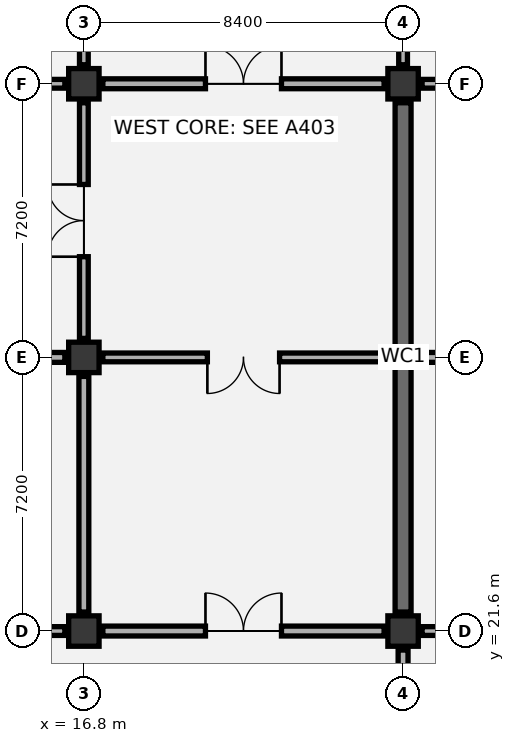
"""IFC4 building model, lengths in metres.
Left out: names, types, materials, properties, quantities, classifications, styles, units other than length and angle.
Written with IfcOpenShell. Run it as: python <this file> out.ifc"""

import sys

from ifc_helpers import new_model, si_unit, direction, frame, frame_2d, origin, origin_2d, place, context, subcontext, project, spatial, rectangle, extrude, element, fill, save


model = new_model("IFC4")
c1 = context("Model", 3, precision=1e-05, world=origin(), true_north=direction((0.0, 1.0)))
c2 = subcontext(c1, "Body", "Model", "MODEL_VIEW")
j1 = project(units=[si_unit("LENGTHUNIT", "METRE"), si_unit("PLANEANGLEUNIT", "RADIAN")], contexts=[c1])
p1 = place(None, origin())
s1 = spatial("IfcSite", under=j1, at=p1, CompositionType="ELEMENT")
p2 = place(p1, origin())
s2 = spatial("IfcBuilding", under=s1, at=p2, CompositionType="ELEMENT")
p3 = place(p2, frame((0.0, 0.0, -9.6)))
s3 = spatial("IfcBuildingStorey", under=s2, at=p3, CompositionType="ELEMENT", Elevation=-9.6)
for number, where, z_axis, x_axis in (
    (1, (16.8, 21.6, 0.0), (0.0, 0.0, 1.0), (1.0, 0.0, 0.0)),
    (2, (16.8, 28.8, 0.0), (0.0, 0.0, 1.0), (1.0, 0.0, 0.0)),
    (3, (16.8, 36.0, 0.0), (0.0, 0.0, 1.0), (1.0, 0.0, 0.0)),
    (4, (25.2, 21.6, 0.0), (0.0, 0.0, 1.0), (1.0, 0.0, 0.0)),
    (5, (25.2, 36.0, 0.0), (0.0, 0.0, 1.0), (1.0, 0.0, 0.0)),
):
    element("IfcColumn", number, at=place(p3, frame(where, z_axis=z_axis, x_axis=x_axis)), inside=s3, PredefinedType="COLUMN", context=c2, shape_type="SweptSolid", body=[
        extrude(rectangle(XDim=0.8, YDim=0.8, at=origin_2d()), origin(), (0.0, 0.0, 1.0), 4.8),
    ])
p4 = place(p3, frame((25.2, 22.1, 0.0), z_axis=(0.0, 0.0, 1.0), x_axis=(0.0, 1.0, 0.0)))
e6 = element("IfcWall", 6, at=p4, inside=s3, PredefinedType="SHEAR", context=c2, shape_type="SweptSolid", body=[
    extrude(rectangle(XDim=13.4, YDim=0.42, at=frame_2d((6.7, 0.0))), origin(), (0.0, 0.0, 1.0), 3.9),
])
p5 = place(p3, frame((8.9, 21.6, 0.0), z_axis=(0.0, 0.0, 1.0), x_axis=(1.0, 0.0, 0.0)))
e7 = element("IfcWall", 7, at=p5, inside=s3, PredefinedType="PARTITIONING", context=c2, shape_type="SweptSolid", body=[
    extrude(rectangle(XDim=7.4, YDim=0.23, at=frame_2d((3.7, 0.0))), origin(), (0.0, 0.0, 1.0), 3.495),
])
p6 = place(p5, frame((2.75, 0.0, 0.0)))
e8 = element("IfcOpeningElement", 8, at=p6, cuts=e7, PredefinedType="OPENING", context=c2, shape_type="SweptSolid", body=[
    extrude(rectangle(XDim=1.9, YDim=2.3, at=frame_2d((0.95, 1.15))), frame((0.0, 0.125, 0.0), z_axis=(0.0, -1.0, 0.0), x_axis=(1.0, 0.0, 0.0)), (0.0, 0.0, 1.0), 0.25),
])
p7 = place(p3, frame((16.8, 22.1, 0.0), z_axis=(0.0, 0.0, 1.0), x_axis=(0.0, 1.0, 0.0)))
e9 = element("IfcWall", 9, at=p7, inside=s3, PredefinedType="PARTITIONING", context=c2, shape_type="SweptSolid", body=[
    extrude(rectangle(XDim=6.2, YDim=0.26, at=frame_2d((3.1, 0.0))), origin(), (0.0, 0.0, 1.0), 3.095),
])
p8 = place(p3, frame((8.9, 28.8, 0.0), z_axis=(0.0, 0.0, 1.0), x_axis=(1.0, 0.0, 0.0)))
e10 = element("IfcWall", 10, at=p8, inside=s3, PredefinedType="PARTITIONING", context=c2, shape_type="SweptSolid", body=[
    extrude(rectangle(XDim=7.4, YDim=0.26, at=frame_2d((3.7, 0.0))), origin(), (0.0, 0.0, 1.0), 3.495),
])
p9 = place(p8, frame((2.7, 0.0, 0.0)))
e11 = element("IfcOpeningElement", 11, at=p9, cuts=e10, PredefinedType="OPENING", context=c2, shape_type="SweptSolid", body=[
    extrude(rectangle(XDim=2.0, YDim=2.35, at=frame_2d((1.0, 1.175))), frame((0.0, 0.14, 0.0), z_axis=(0.0, -1.0, 0.0), x_axis=(1.0, 0.0, 0.0)), (0.0, 0.0, 1.0), 0.28),
])
p10 = place(p3, frame((16.8, 29.3, 0.0), z_axis=(0.0, 0.0, 1.0), x_axis=(0.0, 1.0, 0.0)))
e12 = element("IfcWall", 12, at=p10, inside=s3, PredefinedType="PARTITIONING", context=c2, shape_type="SweptSolid", body=[
    extrude(rectangle(XDim=6.2, YDim=0.23, at=frame_2d((3.1, 0.0))), origin(), (0.0, 0.0, 1.0), 3.095),
])
p11 = place(p10, frame((2.15, 0.0, 0.0)))
e13 = element("IfcOpeningElement", 13, at=p11, cuts=e12, PredefinedType="OPENING", context=c2, shape_type="SweptSolid", body=[
    extrude(rectangle(XDim=1.9, YDim=2.3, at=frame_2d((0.95, 1.15))), frame((0.0, 0.125, 0.0), z_axis=(0.0, -1.0, 0.0), x_axis=(1.0, 0.0, 0.0)), (0.0, 0.0, 1.0), 0.25),
])
p12 = place(p3, frame((8.9, 36.0, 0.0), z_axis=(0.0, 0.0, 1.0), x_axis=(1.0, 0.0, 0.0)))
e14 = element("IfcWall", 14, at=p12, inside=s3, PredefinedType="PARTITIONING", context=c2, shape_type="SweptSolid", body=[
    extrude(rectangle(XDim=7.4, YDim=0.23, at=frame_2d((3.7, 0.0))), origin(), (0.0, 0.0, 1.0), 3.495),
])
p13 = place(p12, frame((2.95, 0.0, 0.0)))
e15 = element("IfcOpeningElement", 15, at=p13, cuts=e14, PredefinedType="OPENING", context=c2, shape_type="SweptSolid", body=[
    extrude(rectangle(XDim=1.5, YDim=2.15, at=frame_2d((0.75, 1.075))), frame((0.0, 0.125, 0.0), z_axis=(0.0, -1.0, 0.0), x_axis=(1.0, 0.0, 0.0)), (0.0, 0.0, 1.0), 0.25),
])
p14 = place(p3, frame((16.8, 36.5, 0.0), z_axis=(0.0, 0.0, 1.0), x_axis=(0.0, 1.0, 0.0)))
e16 = element("IfcWall", 16, at=p14, inside=s3, PredefinedType="PARTITIONING", context=c2, shape_type="SweptSolid", body=[
    extrude(rectangle(XDim=6.2, YDim=0.23, at=frame_2d((3.1, 0.0))), origin(), (0.0, 0.0, 1.0), 3.595),
])
p15 = place(p3, frame((25.2, 14.9, 0.0), z_axis=(0.0, 0.0, 1.0), x_axis=(0.0, 1.0, 0.0)))
e17 = element("IfcWall", 17, at=p15, inside=s3, PredefinedType="PARTITIONING", context=c2, shape_type="SweptSolid", body=[
    extrude(rectangle(XDim=6.2, YDim=0.26, at=frame_2d((3.1, 0.0))), origin(), (0.0, 0.0, 1.0), 3.595),
])
p16 = place(p15, frame((2.15, 0.0, 0.0)))
e18 = element("IfcOpeningElement", 18, at=p16, cuts=e17, PredefinedType="OPENING", context=c2, shape_type="SweptSolid", body=[
    extrude(rectangle(XDim=1.9, YDim=2.3, at=frame_2d((0.95, 1.15))), frame((0.0, 0.14, 0.0), z_axis=(0.0, -1.0, 0.0), x_axis=(1.0, 0.0, 0.0)), (0.0, 0.0, 1.0), 0.28),
])
p17 = place(p3, frame((17.3, 21.6, 0.0), z_axis=(0.0, 0.0, 1.0), x_axis=(1.0, 0.0, 0.0)))
e19 = element("IfcWall", 19, at=p17, inside=s3, PredefinedType="PARTITIONING", context=c2, shape_type="SweptSolid", body=[
    extrude(rectangle(XDim=7.4, YDim=0.26, at=frame_2d((3.7, 0.0))), origin(), (0.0, 0.0, 1.0), 2.995),
])
p18 = place(p17, frame((2.7, 0.0, 0.0)))
e20 = element("IfcOpeningElement", 20, at=p18, cuts=e19, PredefinedType="OPENING", context=c2, shape_type="SweptSolid", body=[
    extrude(rectangle(XDim=2.0, YDim=2.35, at=frame_2d((1.0, 1.175))), frame((0.0, 0.14, 0.0), z_axis=(0.0, -1.0, 0.0), x_axis=(1.0, 0.0, 0.0)), (0.0, 0.0, 1.0), 0.28),
])
p19 = place(p3, frame((17.3, 28.8, 0.0), z_axis=(0.0, 0.0, 1.0), x_axis=(1.0, 0.0, 0.0)))
e21 = element("IfcWall", 21, at=p19, inside=s3, PredefinedType="PARTITIONING", context=c2, shape_type="SweptSolid", body=[
    extrude(rectangle(XDim=7.4, YDim=0.23, at=frame_2d((3.7, 0.0))), origin(), (0.0, 0.0, 1.0), 3.9),
])
p20 = place(p19, frame((2.75, 0.0, 0.0)))
e22 = element("IfcOpeningElement", 22, at=p20, cuts=e21, PredefinedType="OPENING", context=c2, shape_type="SweptSolid", body=[
    extrude(rectangle(XDim=1.9, YDim=2.3, at=frame_2d((0.95, 1.15))), frame((0.0, 0.125, 0.0), z_axis=(0.0, -1.0, 0.0), x_axis=(1.0, 0.0, 0.0)), (0.0, 0.0, 1.0), 0.25),
])
p21 = place(p3, frame((17.3, 36.0, 0.0), z_axis=(0.0, 0.0, 1.0), x_axis=(1.0, 0.0, 0.0)))
e23 = element("IfcWall", 23, at=p21, inside=s3, PredefinedType="PARTITIONING", context=c2, shape_type="SweptSolid", body=[
    extrude(rectangle(XDim=7.4, YDim=0.26, at=frame_2d((3.7, 0.0))), origin(), (0.0, 0.0, 1.0), 2.995),
])
p22 = place(p21, frame((2.7, 0.0, 0.0)))
e24 = element("IfcOpeningElement", 24, at=p22, cuts=e23, PredefinedType="OPENING", context=c2, shape_type="SweptSolid", body=[
    extrude(rectangle(XDim=2.0, YDim=2.35, at=frame_2d((1.0, 1.175))), frame((0.0, 0.14, 0.0), z_axis=(0.0, -1.0, 0.0), x_axis=(1.0, 0.0, 0.0)), (0.0, 0.0, 1.0), 0.28),
])
p23 = place(p3, frame((25.2, 36.5, 0.0), z_axis=(0.0, 0.0, 1.0), x_axis=(0.0, 1.0, 0.0)))
e25 = element("IfcWall", 25, at=p23, inside=s3, PredefinedType="PARTITIONING", context=c2, shape_type="SweptSolid", body=[
    extrude(rectangle(XDim=6.2, YDim=0.23, at=frame_2d((3.1, 0.0))), origin(), (0.0, 0.0, 1.0), 3.595),
])
p24 = place(p23, frame((2.15, 0.0, 0.0)))
e26 = element("IfcOpeningElement", 26, at=p24, cuts=e25, PredefinedType="OPENING", context=c2, shape_type="SweptSolid", body=[
    extrude(rectangle(XDim=1.9, YDim=2.3, at=frame_2d((0.95, 1.15))), frame((0.0, 0.125, 0.0), z_axis=(0.0, -1.0, 0.0), x_axis=(1.0, 0.0, 0.0)), (0.0, 0.0, 1.0), 0.25),
])
p25 = place(p3, frame((25.7, 21.6, 0.0), z_axis=(0.0, 0.0, 1.0), x_axis=(1.0, 0.0, 0.0)))
e27 = element("IfcWall", 27, at=p25, inside=s3, PredefinedType="PARTITIONING", context=c2, shape_type="SweptSolid", body=[
    extrude(rectangle(XDim=7.4, YDim=0.23, at=frame_2d((3.7, 0.0))), origin(), (0.0, 0.0, 1.0), 2.995),
])
p26 = place(p25, frame((2.7, 0.0, 0.0)))
e28 = element("IfcOpeningElement", 28, at=p26, cuts=e27, PredefinedType="OPENING", context=c2, shape_type="SweptSolid", body=[
    extrude(rectangle(XDim=2.0, YDim=2.35, at=frame_2d((1.0, 1.175))), frame((0.0, 0.125, 0.0), z_axis=(0.0, -1.0, 0.0), x_axis=(1.0, 0.0, 0.0)), (0.0, 0.0, 1.0), 0.25),
])
p27 = place(p3, frame((25.7, 28.8, 0.0), z_axis=(0.0, 0.0, 1.0), x_axis=(1.0, 0.0, 0.0)))
e29 = element("IfcWall", 29, at=p27, inside=s3, PredefinedType="PARTITIONING", context=c2, shape_type="SweptSolid", body=[
    extrude(rectangle(XDim=7.4, YDim=0.26, at=frame_2d((3.7, 0.0))), origin(), (0.0, 0.0, 1.0), 3.9),
])
p28 = place(p3, frame((25.7, 36.0, 0.0), z_axis=(0.0, 0.0, 1.0), x_axis=(1.0, 0.0, 0.0)))
e30 = element("IfcWall", 30, at=p28, inside=s3, PredefinedType="PARTITIONING", context=c2, shape_type="SweptSolid", body=[
    extrude(rectangle(XDim=7.4, YDim=0.23, at=frame_2d((3.7, 0.0))), origin(), (0.0, 0.0, 1.0), 2.995),
])
p29 = place(p28, frame((2.75, 0.0, 0.0)))
e31 = element("IfcOpeningElement", 31, at=p29, cuts=e30, PredefinedType="OPENING", context=c2, shape_type="SweptSolid", body=[
    extrude(rectangle(XDim=1.9, YDim=2.3, at=frame_2d((0.95, 1.15))), frame((0.0, 0.125, 0.0), z_axis=(0.0, -1.0, 0.0), x_axis=(1.0, 0.0, 0.0)), (0.0, 0.0, 1.0), 0.25),
])
p30 = place(p11, origin())
e32 = element("IfcDoor", 32, at=p30, inside=s3, OperationType="DOUBLE_DOOR_SINGLE_SWING", PredefinedType="DOOR", context=c2, shape_type="SweptSolid", body=[
    extrude(rectangle(XDim=1.9, YDim=2.3, at=frame_2d((0.95, 1.15))), frame((0.0, 0.025, 0.0), z_axis=(0.0, -1.0, 0.0), x_axis=(1.0, 0.0, 0.0)), (0.0, 0.0, 1.0), 0.05),
])
fill(e13, e32)
p31 = place(p18, origin())
e33 = element("IfcDoor", 33, at=p31, inside=s3, OperationType="DOUBLE_DOOR_SINGLE_SWING", PredefinedType="DOOR", context=c2, shape_type="SweptSolid", body=[
    extrude(rectangle(XDim=2.0, YDim=2.35, at=frame_2d((1.0, 1.175))), frame((0.0, 0.025, 0.0), z_axis=(0.0, -1.0, 0.0), x_axis=(1.0, 0.0, 0.0)), (0.0, 0.0, 1.0), 0.05),
])
fill(e20, e33)
p32 = place(p20, frame((1.9, 0.0, 0.0), z_axis=(0.0, 0.0, 1.0), x_axis=(-1.0, 0.0, 0.0)))
e34 = element("IfcDoor", 34, at=p32, inside=s3, OperationType="DOUBLE_DOOR_SINGLE_SWING", PredefinedType="DOOR", context=c2, shape_type="SweptSolid", body=[
    extrude(rectangle(XDim=1.9, YDim=2.3, at=frame_2d((0.95, 1.15))), frame((0.0, 0.025, 0.0), z_axis=(0.0, -1.0, 0.0), x_axis=(1.0, 0.0, 0.0)), (0.0, 0.0, 1.0), 0.05),
])
fill(e22, e34)
p33 = place(p22, origin())
e35 = element("IfcDoor", 35, at=p33, inside=s3, OperationType="DOUBLE_DOOR_SINGLE_SWING", PredefinedType="DOOR", context=c2, shape_type="SweptSolid", body=[
    extrude(rectangle(XDim=2.0, YDim=2.35, at=frame_2d((1.0, 1.175))), frame((0.0, 0.025, 0.0), z_axis=(0.0, -1.0, 0.0), x_axis=(1.0, 0.0, 0.0)), (0.0, 0.0, 1.0), 0.05),
])
fill(e24, e35)
save(model, sys.argv[1])
